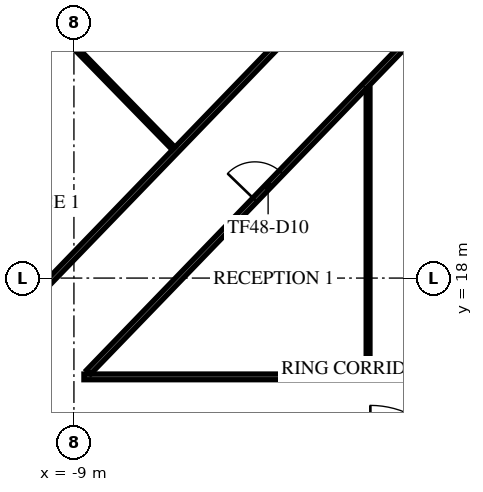
"""IFC4 building model, lengths in metres.
Left out: names, types, materials, properties, quantities, classifications, styles, units other than length and angle.
Written with IfcOpenShell. Run it as: python <this file> out.ifc"""

import sys

from ifc_helpers import new_model, si_unit, direction, frame, frame_2d, origin, place, context, subcontext, project, spatial, rectangle, extrude, element, fill, save


model = new_model("IFC4")
c1 = context("Model", 3, precision=1e-05, world=origin(), true_north=direction((0.0, 1.0)))
c2 = subcontext(c1, "Body", "Model", "MODEL_VIEW")
j1 = project(units=[si_unit("LENGTHUNIT", "METRE"), si_unit("PLANEANGLEUNIT", "RADIAN")], contexts=[c1])
p1 = place(None, origin())
s1 = spatial("IfcSite", under=j1, at=p1, CompositionType="ELEMENT")
p2 = place(p1, origin())
s2 = spatial("IfcBuilding", under=s1, at=p2, CompositionType="ELEMENT")
p3 = place(p2, frame((0.0, 0.0, 205.3)))
s3 = spatial("IfcBuildingStorey", under=s2, at=p3, CompositionType="ELEMENT", Elevation=205.3)
p4 = place(p3, frame((-0.749, 34.782, 0.0), z_axis=(0.0, 0.0, 1.0), x_axis=(-0.694657553534, -0.719340589233, 0.0)))
e1 = element("IfcWall", 1, at=p4, inside=s3, PredefinedType="STANDARD", context=c2, shape_type="SweptSolid", body=[
    extrude(rectangle(XDim=49.0, YDim=0.6, at=frame_2d((24.5, 0.0))), origin(), (0.0, 0.0, 1.0), 3.62),
])
p5 = place(p4, frame((1.227, 0.0, 0.9)))
e2 = element("IfcOpeningElement", 2, at=p5, cuts=e1, PredefinedType="OPENING", context=c2, shape_type="SweptSolid", body=[
    extrude(rectangle(XDim=2.0, YDim=2.1, at=frame_2d((1.0, 1.05))), frame((0.0, 0.31, 0.0), z_axis=(0.0, -1.0, 0.0), x_axis=(1.0, 0.0, 0.0)), (0.0, 0.0, 1.0), 0.62),
])
p6 = place(p4, frame((5.682, 0.0, 0.9)))
e3 = element("IfcOpeningElement", 3, at=p6, cuts=e1, PredefinedType="OPENING", context=c2, shape_type="SweptSolid", body=[
    extrude(rectangle(XDim=2.0, YDim=2.1, at=frame_2d((1.0, 1.05))), frame((0.0, 0.31, 0.0), z_axis=(0.0, -1.0, 0.0), x_axis=(1.0, 0.0, 0.0)), (0.0, 0.0, 1.0), 0.62),
])
p7 = place(p4, frame((10.136, 0.0, 0.9)))
e4 = element("IfcOpeningElement", 4, at=p7, cuts=e1, PredefinedType="OPENING", context=c2, shape_type="SweptSolid", body=[
    extrude(rectangle(XDim=2.0, YDim=2.1, at=frame_2d((1.0, 1.05))), frame((0.0, 0.31, 0.0), z_axis=(0.0, -1.0, 0.0), x_axis=(1.0, 0.0, 0.0)), (0.0, 0.0, 1.0), 0.62),
])
p8 = place(p4, frame((14.591, 0.0, 0.9)))
e5 = element("IfcOpeningElement", 5, at=p8, cuts=e1, PredefinedType="OPENING", context=c2, shape_type="SweptSolid", body=[
    extrude(rectangle(XDim=2.0, YDim=2.1, at=frame_2d((1.0, 1.05))), frame((0.0, 0.31, 0.0), z_axis=(0.0, -1.0, 0.0), x_axis=(1.0, 0.0, 0.0)), (0.0, 0.0, 1.0), 0.62),
])
p9 = place(p4, frame((19.045, 0.0, 0.9)))
e6 = element("IfcOpeningElement", 6, at=p9, cuts=e1, PredefinedType="OPENING", context=c2, shape_type="SweptSolid", body=[
    extrude(rectangle(XDim=2.0, YDim=2.1, at=frame_2d((1.0, 1.05))), frame((0.0, 0.31, 0.0), z_axis=(0.0, -1.0, 0.0), x_axis=(1.0, 0.0, 0.0)), (0.0, 0.0, 1.0), 0.62),
])
p10 = place(p4, frame((23.5, 0.0, 0.9)))
e7 = element("IfcOpeningElement", 7, at=p10, cuts=e1, PredefinedType="OPENING", context=c2, shape_type="SweptSolid", body=[
    extrude(rectangle(XDim=2.0, YDim=2.1, at=frame_2d((1.0, 1.05))), frame((0.0, 0.31, 0.0), z_axis=(0.0, -1.0, 0.0), x_axis=(1.0, 0.0, 0.0)), (0.0, 0.0, 1.0), 0.62),
])
p11 = place(p4, frame((27.955, 0.0, 0.9)))
e8 = element("IfcOpeningElement", 8, at=p11, cuts=e1, PredefinedType="OPENING", context=c2, shape_type="SweptSolid", body=[
    extrude(rectangle(XDim=2.0, YDim=2.1, at=frame_2d((1.0, 1.05))), frame((0.0, 0.31, 0.0), z_axis=(0.0, -1.0, 0.0), x_axis=(1.0, 0.0, 0.0)), (0.0, 0.0, 1.0), 0.62),
])
p12 = place(p4, frame((32.409, 0.0, 0.9)))
e9 = element("IfcOpeningElement", 9, at=p12, cuts=e1, PredefinedType="OPENING", context=c2, shape_type="SweptSolid", body=[
    extrude(rectangle(XDim=2.0, YDim=2.1, at=frame_2d((1.0, 1.05))), frame((0.0, 0.31, 0.0), z_axis=(0.0, -1.0, 0.0), x_axis=(1.0, 0.0, 0.0)), (0.0, 0.0, 1.0), 0.62),
])
p13 = place(p4, frame((36.864, 0.0, 0.9)))
e10 = element("IfcOpeningElement", 10, at=p13, cuts=e1, PredefinedType="OPENING", context=c2, shape_type="SweptSolid", body=[
    extrude(rectangle(XDim=2.0, YDim=2.1, at=frame_2d((1.0, 1.05))), frame((0.0, 0.31, 0.0), z_axis=(0.0, -1.0, 0.0), x_axis=(1.0, 0.0, 0.0)), (0.0, 0.0, 1.0), 0.62),
])
p14 = place(p4, frame((41.318, 0.0, 0.9)))
e11 = element("IfcOpeningElement", 11, at=p14, cuts=e1, PredefinedType="OPENING", context=c2, shape_type="SweptSolid", body=[
    extrude(rectangle(XDim=2.0, YDim=2.1, at=frame_2d((1.0, 1.05))), frame((0.0, 0.31, 0.0), z_axis=(0.0, -1.0, 0.0), x_axis=(1.0, 0.0, 0.0)), (0.0, 0.0, 1.0), 0.62),
])
p15 = place(p4, frame((45.773, 0.0, 0.9)))
e12 = element("IfcOpeningElement", 12, at=p15, cuts=e1, PredefinedType="OPENING", context=c2, shape_type="SweptSolid", body=[
    extrude(rectangle(XDim=2.0, YDim=2.1, at=frame_2d((1.0, 1.05))), frame((0.0, 0.31, 0.0), z_axis=(0.0, -1.0, 0.0), x_axis=(1.0, 0.0, 0.0)), (0.0, 0.0, 1.0), 0.62),
])
p16 = place(p3, frame((-26.96, -0.016, 0.0), z_axis=(0.0, 0.0, 1.0), x_axis=(0.694654845656, 0.719343204184, 0.0)))
e13 = element("IfcWall", 13, at=p16, inside=s3, PredefinedType="PARTITIONING", context=c2, shape_type="SweptSolid", body=[
    extrude(rectangle(XDim=37.479, YDim=0.15, at=frame_2d((18.74, 0.0))), origin(), (0.0, 0.0, 1.0), 2.97),
])
p17 = place(p16, frame((4.3, 0.0, 0.0)))
e14 = element("IfcOpeningElement", 14, at=p17, cuts=e13, PredefinedType="OPENING", context=c2, shape_type="SweptSolid", body=[
    extrude(rectangle(XDim=1.8, YDim=2.1, at=frame_2d((0.9, 1.05))), frame((0.0, 0.085, 0.0), z_axis=(0.0, -1.0, 0.0), x_axis=(1.0, 0.0, 0.0)), (0.0, 0.0, 1.0), 0.17),
])
p18 = place(p16, frame((15.547, 0.0, 0.0)))
e15 = element("IfcOpeningElement", 15, at=p18, cuts=e13, PredefinedType="OPENING", context=c2, shape_type="SweptSolid", body=[
    extrude(rectangle(XDim=1.0, YDim=2.1, at=frame_2d((0.5, 1.05))), frame((0.0, 0.085, 0.0), z_axis=(0.0, -1.0, 0.0), x_axis=(1.0, 0.0, 0.0)), (0.0, 0.0, 1.0), 0.17),
])
p19 = place(p16, frame((22.58, 0.0, 0.0)))
e16 = element("IfcOpeningElement", 16, at=p19, cuts=e13, PredefinedType="OPENING", context=c2, shape_type="SweptSolid", body=[
    extrude(rectangle(XDim=1.0, YDim=2.1, at=frame_2d((0.5, 1.05))), frame((0.0, 0.085, 0.0), z_axis=(0.0, -1.0, 0.0), x_axis=(1.0, 0.0, 0.0)), (0.0, 0.0, 1.0), 0.17),
])
p20 = place(p16, frame((35.508, 0.0, 0.0)))
e17 = element("IfcOpeningElement", 17, at=p20, cuts=e13, PredefinedType="OPENING", context=c2, shape_type="SweptSolid", body=[
    extrude(rectangle(XDim=1.0, YDim=2.1, at=frame_2d((0.5, 1.05))), frame((0.0, 0.085, 0.0), z_axis=(0.0, -1.0, 0.0), x_axis=(1.0, 0.0, 0.0)), (0.0, 0.0, 1.0), 0.17),
])
p21 = place(p3, frame((-8.737, 15.4, 0.0), z_axis=(0.0, 0.0, 1.0), x_axis=(1.0, 0.0, 0.0)))
e18 = element("IfcWall", 18, at=p21, inside=s3, PredefinedType="PARTITIONING", context=c2, shape_type="SweptSolid", body=[
    extrude(rectangle(XDim=18.916, YDim=0.15, at=frame_2d((9.458, 0.0))), origin(), (0.0, 0.0, 1.0), 3.17),
])
p22 = place(p21, frame((17.321, 0.0, 0.0)))
e19 = element("IfcOpeningElement", 19, at=p22, cuts=e18, PredefinedType="OPENING", context=c2, shape_type="SweptSolid", body=[
    extrude(rectangle(XDim=1.0, YDim=2.1, at=frame_2d((0.5, 1.05))), frame((0.0, 0.085, 0.0), z_axis=(0.0, -1.0, 0.0), x_axis=(1.0, 0.0, 0.0)), (0.0, 0.0, 1.0), 0.17),
])
p23 = place(p3, frame((-8.614, 15.527, 0.0), z_axis=(0.0, 0.0, 1.0), x_axis=(0.694688688922, 0.719310520905, 0.0)))
e20 = element("IfcWall", 20, at=p23, inside=s3, PredefinedType="PARTITIONING", context=c2, shape_type="SweptSolid", body=[
    extrude(rectangle(XDim=13.555, YDim=0.15, at=frame_2d((6.777, 0.0))), origin(), (0.0, 0.0, 1.0), 3.17),
])
p24 = place(p23, frame((6.3, 0.0, 0.0)))
e21 = element("IfcOpeningElement", 21, at=p24, cuts=e20, PredefinedType="OPENING", context=c2, shape_type="SweptSolid", body=[
    extrude(rectangle(XDim=1.0, YDim=2.1, at=frame_2d((0.5, 1.05))), frame((0.0, 0.085, 0.0), z_axis=(0.0, -1.0, 0.0), x_axis=(1.0, 0.0, 0.0)), (0.0, 0.0, 1.0), 0.17),
])
p25 = place(p3, frame((-9.826, 24.947, 0.0), z_axis=(0.0, 0.0, 1.0), x_axis=(0.698133061081, -0.715968036316, 0.0)))
e22 = element("IfcWall", 22, at=p25, inside=s3, PredefinedType="PARTITIONING", context=c2, shape_type="SweptSolid", body=[
    extrude(rectangle(XDim=4.942, YDim=0.1, at=frame_2d((2.471, 0.0))), origin(), (0.0, 0.0, 1.0), 2.97),
])
p26 = place(p3, frame((-1.26, 15.475, 0.0), z_axis=(0.0, 0.0, 1.0), x_axis=(0.0, 1.0, 0.0)))
e23 = element("IfcWall", 23, at=p26, inside=s3, PredefinedType="PARTITIONING", context=c2, shape_type="SweptSolid", body=[
    extrude(rectangle(XDim=7.507, YDim=0.1, at=frame_2d((3.754, 0.0))), origin(), (0.0, 0.0, 1.0), 3.62),
])
p27 = place(p24, frame((1.0, 0.0, 0.0), z_axis=(0.0, 0.0, 1.0), x_axis=(-1.0, 0.0, 0.0)))
e24 = element("IfcDoor", 24, at=p27, inside=s3, OperationType="SINGLE_SWING_RIGHT", PredefinedType="DOOR", context=c2, shape_type="SweptSolid", body=[
    extrude(rectangle(XDim=1.0, YDim=2.1, at=frame_2d((0.5, 1.05))), frame((0.0, 0.025, 0.0), z_axis=(0.0, -1.0, 0.0), x_axis=(1.0, 0.0, 0.0)), (0.0, 0.0, 1.0), 0.05),
])
fill(e21, e24)
save(model, sys.argv[1])
